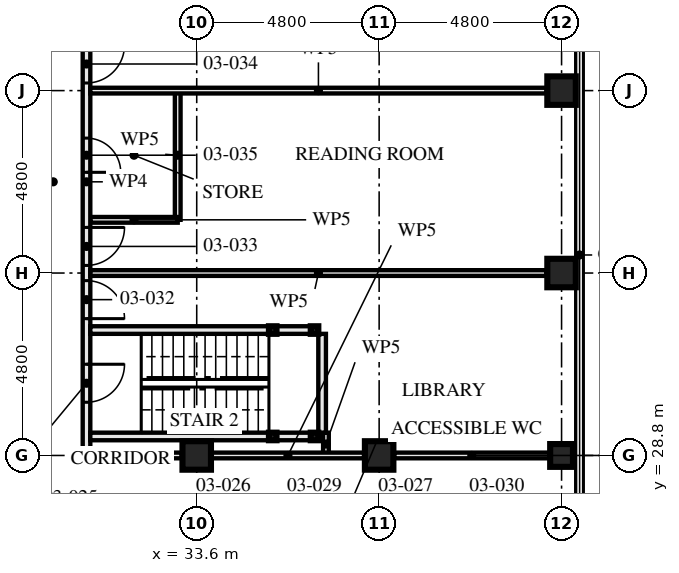
"""IFC4 building model, lengths in metres.
Left out: names, types, materials, properties, quantities, classifications, styles, units other than length and angle.
Written with IfcOpenShell. Run it as: python <this file> out.ifc"""

import sys

from ifc_helpers import new_model, si_unit, direction, frame, frame_2d, origin, origin_2d, place, context, subcontext, project, spatial, rectangle, hollow_rectangle, extrude, element, fill, save


model = new_model("IFC4")
c1 = context("Model", 3, precision=1e-05, world=origin(), true_north=direction((0.0, 1.0)))
c2 = subcontext(c1, "Body", "Model", "MODEL_VIEW")
j1 = project(units=[si_unit("LENGTHUNIT", "METRE"), si_unit("PLANEANGLEUNIT", "RADIAN")], contexts=[c1])
p1 = place(None, origin())
s1 = spatial("IfcSite", under=j1, at=p1, CompositionType="ELEMENT")
p2 = place(p1, origin())
s2 = spatial("IfcBuilding", under=s1, at=p2, CompositionType="ELEMENT")
p3 = place(p2, frame((0.0, 0.0, 13.5)))
s3 = spatial("IfcBuildingStorey", under=s2, at=p3, CompositionType="ELEMENT", Elevation=13.5)
for number, where, z_axis, x_axis in (
    (1, (33.6, 28.8, 0.0), (0.0, 0.0, 1.0), (0.0, 1.0, 0.0)),
    (2, (38.4, 28.8, 0.0), (0.0, 0.0, 1.0), (0.0, 1.0, 0.0)),
):
    element("IfcColumn", number, at=place(p3, frame(where, z_axis=z_axis, x_axis=x_axis)), inside=s3, PredefinedType="COLUMN", context=c2, shape_type="SweptSolid", body=[
        extrude(hollow_rectangle(XDim=0.75, YDim=0.75, WallThickness=0.08, at=origin_2d()), origin(), (0.0, 0.0, 1.0), 4.5),
    ])
p4 = place(p3, frame((43.2, 28.8, 0.0), z_axis=(0.0, 0.0, 1.0), x_axis=(0.0, 1.0, 0.0)))
e3 = element("IfcColumn", 3, at=p4, inside=s3, PredefinedType="COLUMN", context=c2, shape_type="SweptSolid", body=[
    extrude(hollow_rectangle(XDim=0.6, YDim=0.6, WallThickness=0.08, at=origin_2d()), origin(), (0.0, 0.0, 1.0), 4.5),
])
for number, where, z_axis, x_axis in (
    (4, (43.2, 33.6, 0.0), (0.0, 0.0, 1.0), (1.0, 0.0, 0.0)),
    (5, (43.2, 38.4, 0.0), (0.0, 0.0, 1.0), (1.0, 0.0, 0.0)),
):
    element("IfcColumn", number, at=place(p3, frame(where, z_axis=z_axis, x_axis=x_axis)), inside=s3, PredefinedType="COLUMN", context=c2, shape_type="SweptSolid", body=[
        extrude(hollow_rectangle(XDim=0.75, YDim=0.75, WallThickness=0.08, at=origin_2d()), origin(), (0.0, 0.0, 1.0), 4.5),
    ])
for number, where, z_axis, x_axis in (
    (6, (36.7, 29.3, 0.0), (0.0, 0.0, 1.0), (1.0, 0.0, 0.0)),
    (7, (36.7, 32.1, 0.0), (0.0, 0.0, 1.0), (1.0, 0.0, 0.0)),
    (8, (35.6, 29.3, 0.0), (0.0, 0.0, 1.0), (1.0, 0.0, 0.0)),
    (9, (35.6, 32.1, 0.0), (0.0, 0.0, 1.0), (1.0, 0.0, 0.0)),
):
    element("IfcColumn", number, at=place(p3, frame(where, z_axis=z_axis, x_axis=x_axis)), inside=s3, PredefinedType="COLUMN", context=c2, shape_type="SweptSolid", body=[
        extrude(hollow_rectangle(XDim=0.2, YDim=0.2, WallThickness=0.008, at=origin_2d()), origin(), (0.0, 0.0, 1.0), 4.33),
    ])
p5 = place(p3, frame((36.6, 29.3, 0.0), z_axis=(0.0, 0.0, 1.0), x_axis=(-1.0, 0.0, 0.0)))
e10 = element("IfcWall", 10, at=p5, inside=s3, PredefinedType="SOLIDWALL", context=c2, shape_type="SweptSolid", body=[
    extrude(rectangle(XDim=0.9, YDim=0.2, at=frame_2d((0.45, 0.0))), origin(), (0.0, 0.0, 1.0), 3.99),
])
p6 = place(p3, frame((35.5, 29.3, 0.0), z_axis=(0.0, 0.0, 1.0), x_axis=(-1.0, 0.0, 0.0)))
e11 = element("IfcWall", 11, at=p6, inside=s3, PredefinedType="SOLIDWALL", context=c2, shape_type="SweptSolid", body=[
    extrude(rectangle(XDim=4.7, YDim=0.2, at=frame_2d((2.35, 0.0))), origin(), (0.0, 0.0, 1.0), 3.99),
])
p7 = place(p3, frame((36.6, 32.1, 0.0), z_axis=(0.0, 0.0, 1.0), x_axis=(-1.0, 0.0, 0.0)))
e12 = element("IfcWall", 12, at=p7, inside=s3, PredefinedType="SOLIDWALL", context=c2, shape_type="SweptSolid", body=[
    extrude(rectangle(XDim=0.9, YDim=0.2, at=frame_2d((0.45, 0.0))), origin(), (0.0, 0.0, 1.0), 3.99),
])
p8 = place(p3, frame((35.5, 32.1, 0.0), z_axis=(0.0, 0.0, 1.0), x_axis=(-1.0, 0.0, 0.0)))
e13 = element("IfcWall", 13, at=p8, inside=s3, PredefinedType="SOLIDWALL", context=c2, shape_type="SweptSolid", body=[
    extrude(rectangle(XDim=4.7, YDim=0.2, at=frame_2d((2.35, 0.0))), origin(), (0.0, 0.0, 1.0), 3.99),
])
p9 = place(p3, frame((36.9, 29.4, 0.0), z_axis=(0.0, 0.0, 1.0), x_axis=(0.0, 1.0, 0.0)))
e14 = element("IfcWall", 14, at=p9, inside=s3, PredefinedType="SOLIDWALL", context=c2, shape_type="SweptSolid", body=[
    extrude(rectangle(XDim=2.6, YDim=0.2, at=frame_2d((1.3, 0.0))), origin(), (0.0, 0.0, 1.0), 4.33),
])
p10 = place(p3, frame((33.1, 35.0, 0.0), z_axis=(0.0, 0.0, 1.0), x_axis=(-1.0, 0.0, 0.0)))
e15 = element("IfcWall", 15, at=p10, inside=s3, PredefinedType="PARTITIONING", context=c2, shape_type="SweptSolid", body=[
    extrude(rectangle(XDim=2.3, YDim=0.15, at=frame_2d((1.15, 0.0))), origin(), (0.0, 0.0, 1.0), 4.33),
])
p11 = place(p3, frame((33.1, 35.0, 0.0), z_axis=(0.0, 0.0, 1.0), x_axis=(0.0, 1.0, 0.0)))
e16 = element("IfcWall", 16, at=p11, inside=s3, PredefinedType="PARTITIONING", context=c2, shape_type="SweptSolid", body=[
    extrude(rectangle(XDim=3.4, YDim=0.15, at=frame_2d((1.7, 0.0))), origin(), (0.0, 0.0, 1.0), 4.33),
])
for number, where, z_axis, x_axis in (
    (17, (42.805, 33.6, 0.0), (0.0, 0.0, 1.0), (-1.0, 0.0, 0.0)),
    (18, (42.805, 38.4, 0.0), (0.0, 0.0, 1.0), (-1.0, 0.0, 0.0)),
):
    element("IfcWall", number, at=place(p3, frame(where, z_axis=z_axis, x_axis=x_axis)), inside=s3, PredefinedType="PARTITIONING", context=c2, shape_type="SweptSolid", body=[
        extrude(rectangle(XDim=12.005, YDim=0.15, at=frame_2d((6.002, 0.0))), origin(), (0.0, 0.0, 1.0), 3.55),
    ])
p12 = place(p3, frame((37.0, 28.8, 0.0), z_axis=(0.0, 0.0, 1.0), x_axis=(0.0, 1.0, 0.0)))
e19 = element("IfcWall", 19, at=p12, inside=s3, PredefinedType="PARTITIONING", context=c2, shape_type="SweptSolid", body=[
    extrude(rectangle(XDim=0.6, YDim=0.15, at=frame_2d((0.3, 0.0))), origin(), (0.0, 0.0, 1.0), 4.33),
])
p13 = place(p3, frame((30.7, 28.8, 0.0), z_axis=(0.0, 0.0, 1.0), x_axis=(0.0, 1.0, 0.0)))
e20 = element("IfcWall", 20, at=p13, inside=s3, PredefinedType="PARTITIONING", context=c2, shape_type="SweptSolid", body=[
    extrude(rectangle(XDim=14.4, YDim=0.2, at=frame_2d((7.2, 0.0))), origin(), (0.0, 0.0, 1.0), 3.55),
])
p14 = place(p13, frame((1.4, 0.0, 0.0)))
e21 = element("IfcOpeningElement", 21, at=p14, cuts=e20, PredefinedType="OPENING", context=c2, shape_type="SweptSolid", body=[
    extrude(rectangle(XDim=1.0, YDim=2.1, at=frame_2d((0.5, 1.05))), frame((0.0, 0.111, 0.0), z_axis=(0.0, -1.0, 0.0), x_axis=(1.0, 0.0, 0.0)), (0.0, 0.0, 1.0), 0.221),
])
p15 = place(p13, frame((3.6, 0.0, 0.0)))
e22 = element("IfcOpeningElement", 22, at=p15, cuts=e20, PredefinedType="OPENING", context=c2, shape_type="SweptSolid", body=[
    extrude(rectangle(XDim=1.0, YDim=2.4, at=frame_2d((0.5, 1.2))), frame((0.0, 0.111, 0.0), z_axis=(0.0, -1.0, 0.0), x_axis=(1.0, 0.0, 0.0)), (0.0, 0.0, 1.0), 0.221),
])
p16 = place(p13, frame((5.0, 0.0, 0.0)))
e23 = element("IfcOpeningElement", 23, at=p16, cuts=e20, PredefinedType="OPENING", context=c2, shape_type="SweptSolid", body=[
    extrude(rectangle(XDim=1.0, YDim=2.4, at=frame_2d((0.5, 1.2))), frame((0.0, 0.111, 0.0), z_axis=(0.0, -1.0, 0.0), x_axis=(1.0, 0.0, 0.0)), (0.0, 0.0, 1.0), 0.221),
])
p17 = place(p13, frame((9.8, 0.0, 0.0)))
e24 = element("IfcOpeningElement", 24, at=p17, cuts=e20, PredefinedType="OPENING", context=c2, shape_type="SweptSolid", body=[
    extrude(rectangle(XDim=1.0, YDim=2.4, at=frame_2d((0.5, 1.2))), frame((0.0, 0.111, 0.0), z_axis=(0.0, -1.0, 0.0), x_axis=(1.0, 0.0, 0.0)), (0.0, 0.0, 1.0), 0.221),
])
p18 = place(p13, frame((7.45, 0.0, 0.0)))
e25 = element("IfcOpeningElement", 25, at=p18, cuts=e20, PredefinedType="OPENING", context=c2, shape_type="SweptSolid", body=[
    extrude(rectangle(XDim=0.9, YDim=2.1, at=frame_2d((0.45, 1.05))), frame((0.0, 0.111, 0.0), z_axis=(0.0, -1.0, 0.0), x_axis=(1.0, 0.0, 0.0)), (0.0, 0.0, 1.0), 0.221),
])
p19 = place(p13, frame((12.2, 0.0, 0.0)))
e26 = element("IfcOpeningElement", 26, at=p19, cuts=e20, PredefinedType="OPENING", context=c2, shape_type="SweptSolid", body=[
    extrude(rectangle(XDim=1.0, YDim=2.1, at=frame_2d((0.5, 1.05))), frame((0.0, 0.111, 0.0), z_axis=(0.0, -1.0, 0.0), x_axis=(1.0, 0.0, 0.0)), (0.0, 0.0, 1.0), 0.221),
])
p20 = place(p3, frame((42.88, 28.8, 0.0), z_axis=(0.0, 0.0, 1.0), x_axis=(-1.0, 0.0, 0.0)))
e27 = element("IfcWall", 27, at=p20, inside=s3, PredefinedType="PARTITIONING", context=c2, shape_type="SweptSolid", body=[
    extrude(rectangle(XDim=4.085, YDim=0.15, at=frame_2d((2.042, 0.0))), origin(), (0.0, 0.0, 1.0), 3.32),
])
p21 = place(p3, frame((38.005, 28.8, 0.0), z_axis=(0.0, 0.0, 1.0), x_axis=(-1.0, 0.0, 0.0)))
e28 = element("IfcWall", 28, at=p21, inside=s3, PredefinedType="PARTITIONING", context=c2, shape_type="SweptSolid", body=[
    extrude(rectangle(XDim=4.01, YDim=0.15, at=frame_2d((2.005, 0.0))), origin(), (0.0, 0.0, 1.0), 3.32),
])
p22 = place(p3, frame((33.205, 28.8, 0.0), z_axis=(0.0, 0.0, 1.0), x_axis=(-1.0, 0.0, 0.0)))
e29 = element("IfcWall", 29, at=p22, inside=s3, PredefinedType="PARTITIONING", context=c2, shape_type="SweptSolid", body=[
    extrude(rectangle(XDim=2.505, YDim=0.15, at=frame_2d((1.252, 0.0))), origin(), (0.0, 0.0, 1.0), 3.32),
])
p23 = place(p14, frame((1.0, 0.0, 0.0), z_axis=(0.0, 0.0, 1.0), x_axis=(-1.0, 0.0, 0.0)))
e30 = element("IfcDoor", 30, at=p23, inside=s3, OperationType="SINGLE_SWING_RIGHT", PredefinedType="DOOR", context=c2, shape_type="SweptSolid", body=[
    extrude(rectangle(XDim=1.0, YDim=2.1, at=frame_2d((0.5, 1.05))), frame((0.0, 0.032, 0.0), z_axis=(0.0, -1.0, 0.0), x_axis=(1.0, 0.0, 0.0)), (0.0, 0.0, 1.0), 0.064),
])
fill(e21, e30)
p24 = place(p15, frame((1.0, 0.0, 0.0), z_axis=(0.0, 0.0, 1.0), x_axis=(-1.0, 0.0, 0.0)))
e31 = element("IfcDoor", 31, at=p24, inside=s3, OperationType="SINGLE_SWING_LEFT", PredefinedType="DOOR", context=c2, shape_type="SweptSolid", body=[
    extrude(rectangle(XDim=1.0, YDim=2.4, at=frame_2d((0.5, 1.2))), frame((0.0, 0.027, 0.0), z_axis=(0.0, -1.0, 0.0), x_axis=(1.0, 0.0, 0.0)), (0.0, 0.0, 1.0), 0.054),
])
fill(e22, e31)
p25 = place(p16, frame((1.0, 0.0, 0.0), z_axis=(0.0, 0.0, 1.0), x_axis=(-1.0, 0.0, 0.0)))
e32 = element("IfcDoor", 32, at=p25, inside=s3, OperationType="SINGLE_SWING_RIGHT", PredefinedType="DOOR", context=c2, shape_type="SweptSolid", body=[
    extrude(rectangle(XDim=1.0, YDim=2.4, at=frame_2d((0.5, 1.2))), frame((0.0, 0.027, 0.0), z_axis=(0.0, -1.0, 0.0), x_axis=(1.0, 0.0, 0.0)), (0.0, 0.0, 1.0), 0.054),
])
fill(e23, e32)
p26 = place(p17, frame((1.0, 0.0, 0.0), z_axis=(0.0, 0.0, 1.0), x_axis=(-1.0, 0.0, 0.0)))
e33 = element("IfcDoor", 33, at=p26, inside=s3, OperationType="SINGLE_SWING_RIGHT", PredefinedType="DOOR", context=c2, shape_type="SweptSolid", body=[
    extrude(rectangle(XDim=1.0, YDim=2.4, at=frame_2d((0.5, 1.2))), frame((0.0, 0.027, 0.0), z_axis=(0.0, -1.0, 0.0), x_axis=(1.0, 0.0, 0.0)), (0.0, 0.0, 1.0), 0.054),
])
fill(e24, e33)
p27 = place(p18, frame((0.9, 0.0, 0.0), z_axis=(0.0, 0.0, 1.0), x_axis=(-1.0, 0.0, 0.0)))
e34 = element("IfcDoor", 34, at=p27, inside=s3, OperationType="SINGLE_SWING_LEFT", PredefinedType="DOOR", context=c2, shape_type="SweptSolid", body=[
    extrude(rectangle(XDim=0.9, YDim=2.1, at=frame_2d((0.45, 1.05))), frame((0.0, 0.027, 0.0), z_axis=(0.0, -1.0, 0.0), x_axis=(1.0, 0.0, 0.0)), (0.0, 0.0, 1.0), 0.054),
])
fill(e25, e34)
save(model, sys.argv[1])
